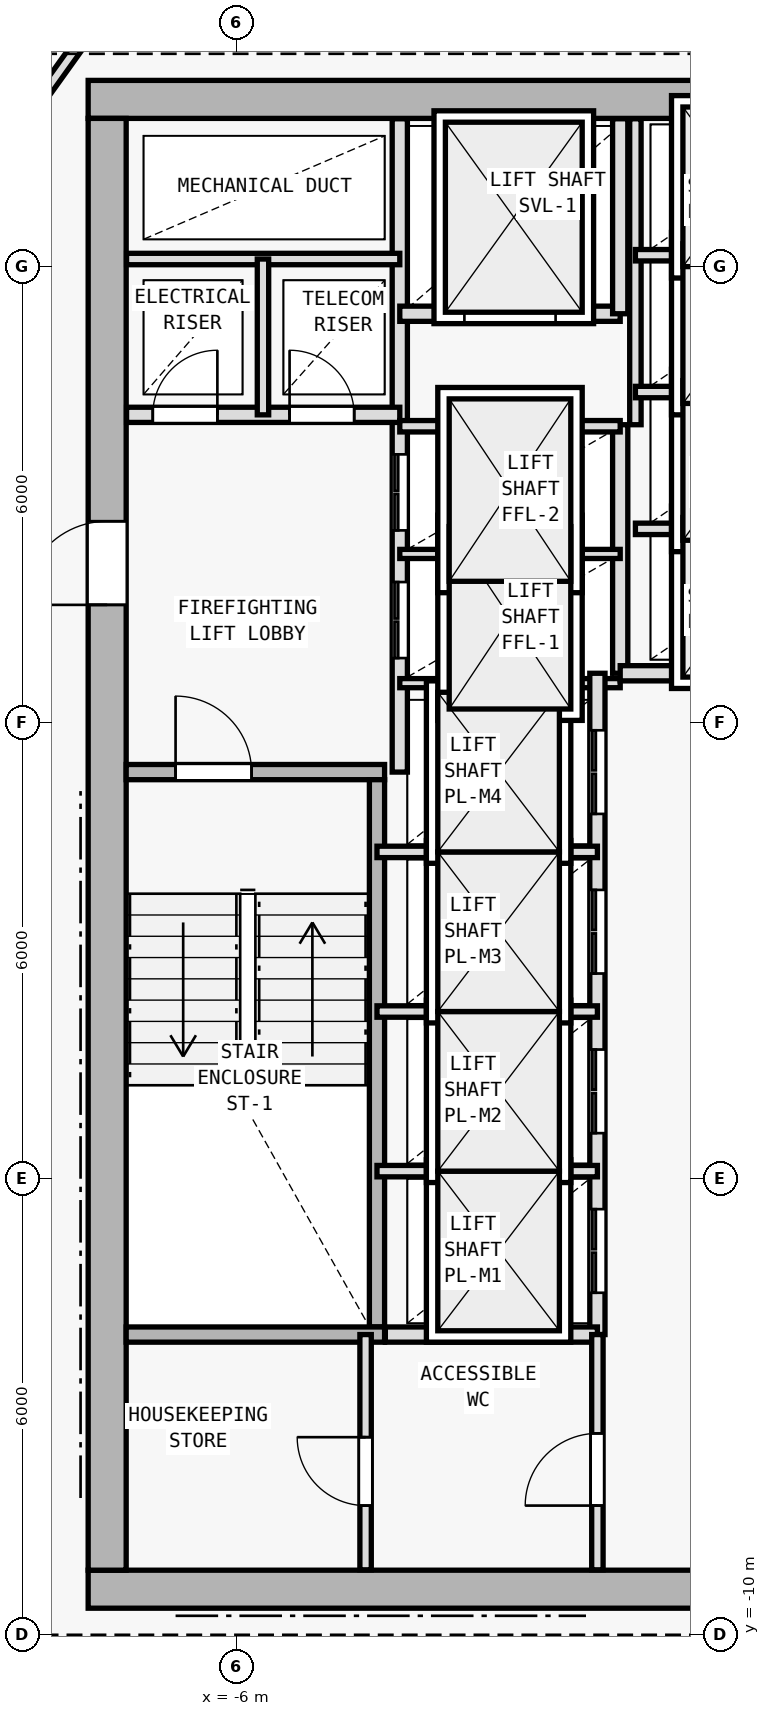
"""IFC4 building model, lengths in metres.
Left out: names, types, materials, properties, quantities, classifications, styles, units other than length and angle.
Written with IfcOpenShell. Run it as: python <this file> out.ifc"""

import sys

from ifc_helpers import new_model, si_unit, direction, frame, frame_2d, origin, origin_2d, place, context, subcontext, project, spatial, rectangle, i_section, extrude, element, fill, save


model = new_model("IFC4")
c1 = context("Model", 3, precision=1e-05, world=origin(), true_north=direction((0.0, 1.0)))
c2 = subcontext(c1, "Body", "Model", "MODEL_VIEW")
j1 = project(units=[si_unit("LENGTHUNIT", "METRE"), si_unit("PLANEANGLEUNIT", "RADIAN")], contexts=[c1])
p1 = place(None, origin())
s1 = spatial("IfcSite", under=j1, at=p1, CompositionType="ELEMENT")
p2 = place(p1, origin())
s2 = spatial("IfcBuilding", under=s1, at=p2, CompositionType="ELEMENT")
p3 = place(p2, frame((0.0, 0.0, 194.7)))
s3 = spatial("IfcBuildingStorey", under=s2, at=p3, CompositionType="ELEMENT", Elevation=194.7)
for number, where, z_axis, x_axis in (
    (1, (-7.7, -9.4, 0.0), (0.0, 0.0, 1.0), (1.0, 0.0, 0.0)),
    (2, (-7.7, 10.2, 0.0), (0.0, 0.0, 1.0), (1.0, 0.0, 0.0)),
    (3, (0.0, -9.4, 0.0), (0.0, 0.0, 1.0), (1.0, 0.0, 0.0)),
    (4, (-7.7, 2.0, 0.0), (0.0, 0.0, 1.0), (1.0, 0.0, 0.0)),
):
    element("IfcColumn", number, at=place(p3, frame(where, z_axis=z_axis, x_axis=x_axis)), inside=s3, PredefinedType="COLUMN", context=c2, shape_type="SweptSolid", body=[
        extrude(i_section(OverallWidth=0.398, OverallDepth=0.387, WebThickness=0.013, FlangeThickness=0.022, FilletRadius=0.015, at=origin_2d()), origin(), (0.0, 0.0, 1.0), 3.6),
    ])
p4 = place(p3, frame((-7.95, -9.4, 0.0), z_axis=(0.0, 0.0, 1.0), x_axis=(1.0, 0.0, 0.0)))
e5 = element("IfcWall", 5, at=p4, inside=s3, PredefinedType="SHEAR", context=c2, shape_type="SweptSolid", body=[
    extrude(rectangle(XDim=15.9, YDim=0.5, at=frame_2d((7.95, 0.0))), origin(), (0.0, 0.0, 1.0), 3.35),
])
p5 = place(p4, frame((9.6, 0.0, 0.0)))
e6 = element("IfcOpeningElement", 6, at=p5, cuts=e5, PredefinedType="OPENING", context=c2, shape_type="SweptSolid", body=[
    extrude(rectangle(XDim=1.5, YDim=2.2, at=frame_2d((0.75, 1.1))), frame((0.0, 0.26, 0.0), z_axis=(0.0, -1.0, 0.0), x_axis=(1.0, 0.0, 0.0)), (0.0, 0.0, 1.0), 0.52),
])
p6 = place(p3, frame((7.95, 10.2, 0.0), z_axis=(0.0, 0.0, 1.0), x_axis=(-1.0, 0.0, 0.0)))
e7 = element("IfcWall", 7, at=p6, inside=s3, PredefinedType="SHEAR", context=c2, shape_type="SweptSolid", body=[
    extrude(rectangle(XDim=15.9, YDim=0.5, at=frame_2d((7.95, 0.0))), origin(), (0.0, 0.0, 1.0), 3.35),
])
p7 = place(p6, frame((4.4, 0.0, 0.0)))
e8 = element("IfcOpeningElement", 8, at=p7, cuts=e7, PredefinedType="OPENING", context=c2, shape_type="SweptSolid", body=[
    extrude(rectangle(XDim=1.1, YDim=2.15, at=frame_2d((0.55, 1.075))), frame((0.0, 0.26, 0.0), z_axis=(0.0, -1.0, 0.0), x_axis=(1.0, 0.0, 0.0)), (0.0, 0.0, 1.0), 0.52),
])
p8 = place(p3, frame((-7.7, -9.15, 0.0), z_axis=(0.0, 0.0, 1.0), x_axis=(0.0, 1.0, 0.0)))
e9 = element("IfcWall", 9, at=p8, inside=s3, PredefinedType="SHEAR", context=c2, shape_type="SweptSolid", body=[
    extrude(rectangle(XDim=19.1, YDim=0.5, at=frame_2d((9.55, 0.0))), origin(), (0.0, 0.0, 1.0), 3.35),
])
p9 = place(p8, frame((12.7, 0.0, 0.0)))
e10 = element("IfcOpeningElement", 10, at=p9, cuts=e9, PredefinedType="OPENING", context=c2, shape_type="SweptSolid", body=[
    extrude(rectangle(XDim=1.1, YDim=2.15, at=frame_2d((0.55, 1.075))), frame((0.0, 0.26, 0.0), z_axis=(0.0, -1.0, 0.0), x_axis=(1.0, 0.0, 0.0)), (0.0, 0.0, 1.0), 0.52),
])
p10 = place(p3, frame((-7.45, 1.35, 0.0), z_axis=(0.0, 0.0, 1.0), x_axis=(1.0, 0.0, 0.0)))
e11 = element("IfcWall", 11, at=p10, inside=s3, PredefinedType="SOLIDWALL", context=c2, shape_type="SweptSolid", body=[
    extrude(rectangle(XDim=3.4, YDim=0.2, at=frame_2d((1.7, 0.0))), origin(), (0.0, 0.0, 1.0), 3.35),
])
p11 = place(p10, frame((0.65, 0.0, 0.0)))
e12 = element("IfcOpeningElement", 12, at=p11, cuts=e11, PredefinedType="OPENING", context=c2, shape_type="SweptSolid", body=[
    extrude(rectangle(XDim=1.0, YDim=2.15, at=frame_2d((0.5, 1.075))), frame((0.0, 0.11, 0.0), z_axis=(0.0, -1.0, 0.0), x_axis=(1.0, 0.0, 0.0)), (0.0, 0.0, 1.0), 0.22),
])
p12 = place(p3, frame((-4.15, -5.95, 0.0), z_axis=(0.0, 0.0, 1.0), x_axis=(0.0, 1.0, 0.0)))
e13 = element("IfcWall", 13, at=p12, inside=s3, PredefinedType="SOLIDWALL", context=c2, shape_type="SweptSolid", body=[
    extrude(rectangle(XDim=7.2, YDim=0.2, at=frame_2d((3.6, 0.0))), origin(), (0.0, 0.0, 1.0), 3.35),
])
p13 = place(p3, frame((-3.85, 1.35, 0.0), z_axis=(0.0, 0.0, 1.0), x_axis=(0.0, 1.0, 0.0)))
e14 = element("IfcWall", 14, at=p13, inside=s3, PredefinedType="SOLIDWALL", context=c2, shape_type="SweptSolid", body=[
    extrude(rectangle(XDim=8.595, YDim=0.2, at=frame_2d((4.297, 0.0))), origin(), (0.0, 0.0, 1.0), 3.35),
])
p14 = place(p13, frame((1.5, 0.0, 0.0)))
e15 = element("IfcOpeningElement", 15, at=p14, cuts=e14, PredefinedType="OPENING", context=c2, shape_type="SweptSolid", body=[
    extrude(rectangle(XDim=1.0, YDim=2.15, at=frame_2d((0.5, 1.075))), frame((0.0, 0.11, 0.0), z_axis=(0.0, -1.0, 0.0), x_axis=(1.0, 0.0, 0.0)), (0.0, 0.0, 1.0), 0.22),
])
p15 = place(p13, frame((3.18, 0.0, 0.0)))
e16 = element("IfcOpeningElement", 16, at=p15, cuts=e14, PredefinedType="OPENING", context=c2, shape_type="SweptSolid", body=[
    extrude(rectangle(XDim=1.0, YDim=2.15, at=frame_2d((0.5, 1.075))), frame((0.0, 0.11, 0.0), z_axis=(0.0, -1.0, 0.0), x_axis=(1.0, 0.0, 0.0)), (0.0, 0.0, 1.0), 0.22),
])
p16 = place(p3, frame((-7.445, 6.05, 0.0), z_axis=(0.0, 0.0, 1.0), x_axis=(1.0, 0.0, 0.0)))
e17 = element("IfcWall", 17, at=p16, inside=s3, PredefinedType="SOLIDWALL", context=c2, shape_type="SweptSolid", body=[
    extrude(rectangle(XDim=3.595, YDim=0.2, at=frame_2d((1.797, 0.0))), origin(), (0.0, 0.0, 1.0), 3.35),
])
p17 = place(p16, frame((0.345, 0.0, 0.0)))
e18 = element("IfcOpeningElement", 18, at=p17, cuts=e17, PredefinedType="OPENING", context=c2, shape_type="SweptSolid", body=[
    extrude(rectangle(XDim=0.85, YDim=2.1, at=frame_2d((0.425, 1.05))), frame((0.0, 0.11, 0.0), z_axis=(0.0, -1.0, 0.0), x_axis=(1.0, 0.0, 0.0)), (0.0, 0.0, 1.0), 0.22),
])
p18 = place(p16, frame((2.145, 0.0, 0.0)))
e19 = element("IfcOpeningElement", 19, at=p18, cuts=e17, PredefinedType="OPENING", context=c2, shape_type="SweptSolid", body=[
    extrude(rectangle(XDim=0.85, YDim=2.1, at=frame_2d((0.425, 1.05))), frame((0.0, 0.11, 0.0), z_axis=(0.0, -1.0, 0.0), x_axis=(1.0, 0.0, 0.0)), (0.0, 0.0, 1.0), 0.22),
])
p19 = place(p3, frame((-7.445, 8.1, 0.0), z_axis=(0.0, 0.0, 1.0), x_axis=(1.0, 0.0, 0.0)))
e20 = element("IfcWall", 20, at=p19, inside=s3, PredefinedType="PARTITIONING", context=c2, shape_type="SweptSolid", body=[
    extrude(rectangle(XDim=3.595, YDim=0.15, at=frame_2d((1.797, 0.0))), origin(), (0.0, 0.0, 1.0), 3.35),
])
p20 = place(p3, frame((-5.65, 6.05, 0.0), z_axis=(0.0, 0.0, 1.0), x_axis=(0.0, 1.0, 0.0)))
e21 = element("IfcWall", 21, at=p20, inside=s3, PredefinedType="PARTITIONING", context=c2, shape_type="SweptSolid", body=[
    extrude(rectangle(XDim=2.05, YDim=0.15, at=frame_2d((1.025, 0.0))), origin(), (0.0, 0.0, 1.0), 3.35),
])
p21 = place(p3, frame((-0.95, 2.65, 0.0), z_axis=(0.0, 0.0, 1.0), x_axis=(0.0, 1.0, 0.0)))
e22 = element("IfcWall", 22, at=p21, inside=s3, PredefinedType="SOLIDWALL", context=c2, shape_type="SweptSolid", body=[
    extrude(rectangle(XDim=3.27, YDim=0.2, at=frame_2d((1.635, 0.0))), origin(), (0.0, 0.0, 1.0), 3.35),
])
for number, where, z_axis, x_axis in (
    (23, (-3.85, 2.52, 0.0), (0.0, 0.0, 1.0), (1.0, 0.0, 0.0)),
    (24, (-3.85, 4.22, 0.0), (0.0, 0.0, 1.0), (1.0, 0.0, 0.0)),
):
    element("IfcWall", number, at=place(p3, frame(where, z_axis=z_axis, x_axis=x_axis)), inside=s3, PredefinedType="PARTITIONING", context=c2, shape_type="SweptSolid", body=[
        extrude(rectangle(XDim=2.9, YDim=0.12, at=frame_2d((1.45, 0.0))), origin(), (0.0, 0.0, 1.0), 3.35),
    ])
p22 = place(p3, frame((-3.85, 5.9, 0.0), z_axis=(0.0, 0.0, 1.0), x_axis=(1.0, 0.0, 0.0)))
e25 = element("IfcWall", 25, at=p22, inside=s3, PredefinedType="PARTITIONING", context=c2, shape_type="SweptSolid", body=[
    extrude(rectangle(XDim=2.9, YDim=0.15, at=frame_2d((1.45, 0.0))), origin(), (0.0, 0.0, 1.0), 3.35),
])
p23 = place(p3, frame((-3.85, 7.38, 0.0), z_axis=(0.0, 0.0, 1.0), x_axis=(1.0, 0.0, 0.0)))
e26 = element("IfcWall", 26, at=p23, inside=s3, PredefinedType="SOLIDWALL", context=c2, shape_type="SweptSolid", body=[
    extrude(rectangle(XDim=2.9, YDim=0.2, at=frame_2d((1.45, 0.0))), origin(), (0.0, 0.0, 1.0), 3.35),
])
p24 = place(p23, frame((0.85, 0.0, 0.0)))
e27 = element("IfcOpeningElement", 27, at=p24, cuts=e26, PredefinedType="OPENING", context=c2, shape_type="SweptSolid", body=[
    extrude(rectangle(XDim=1.2, YDim=2.2, at=frame_2d((0.6, 1.1))), frame((0.0, 0.11, 0.0), z_axis=(0.0, -1.0, 0.0), x_axis=(1.0, 0.0, 0.0)), (0.0, 0.0, 1.0), 0.22),
])
p25 = place(p3, frame((-0.95, 7.38, 0.0), z_axis=(0.0, 0.0, 1.0), x_axis=(0.0, 1.0, 0.0)))
e28 = element("IfcWall", 28, at=p25, inside=s3, PredefinedType="SOLIDWALL", context=c2, shape_type="SweptSolid", body=[
    extrude(rectangle(XDim=2.565, YDim=0.2, at=frame_2d((1.283, 0.0))), origin(), (0.0, 0.0, 1.0), 3.35),
])
p26 = place(p3, frame((-1.25, -6.05, 0.0), z_axis=(0.0, 0.0, 1.0), x_axis=(0.0, 1.0, 0.0)))
e29 = element("IfcWall", 29, at=p26, inside=s3, PredefinedType="SOLIDWALL", context=c2, shape_type="SweptSolid", body=[
    extrude(rectangle(XDim=8.7, YDim=0.2, at=frame_2d((4.35, 0.0))), origin(), (0.0, 0.0, 1.0), 3.35),
])
p27 = place(p26, frame((0.55, 0.0, 0.0)))
e30 = element("IfcOpeningElement", 30, at=p27, cuts=e29, PredefinedType="OPENING", context=c2, shape_type="SweptSolid", body=[
    extrude(rectangle(XDim=1.1, YDim=2.15, at=frame_2d((0.55, 1.075))), frame((0.0, 0.11, 0.0), z_axis=(0.0, -1.0, 0.0), x_axis=(1.0, 0.0, 0.0)), (0.0, 0.0, 1.0), 0.22),
])
p28 = place(p26, frame((2.65, 0.0, 0.0)))
e31 = element("IfcOpeningElement", 31, at=p28, cuts=e29, PredefinedType="OPENING", context=c2, shape_type="SweptSolid", body=[
    extrude(rectangle(XDim=1.1, YDim=2.15, at=frame_2d((0.55, 1.075))), frame((0.0, 0.11, 0.0), z_axis=(0.0, -1.0, 0.0), x_axis=(1.0, 0.0, 0.0)), (0.0, 0.0, 1.0), 0.22),
])
p29 = place(p26, frame((4.75, 0.0, 0.0)))
e32 = element("IfcOpeningElement", 32, at=p29, cuts=e29, PredefinedType="OPENING", context=c2, shape_type="SweptSolid", body=[
    extrude(rectangle(XDim=1.1, YDim=2.15, at=frame_2d((0.55, 1.075))), frame((0.0, 0.11, 0.0), z_axis=(0.0, -1.0, 0.0), x_axis=(1.0, 0.0, 0.0)), (0.0, 0.0, 1.0), 0.22),
])
p30 = place(p26, frame((6.85, 0.0, 0.0)))
e33 = element("IfcOpeningElement", 33, at=p30, cuts=e29, PredefinedType="OPENING", context=c2, shape_type="SweptSolid", body=[
    extrude(rectangle(XDim=1.1, YDim=2.15, at=frame_2d((0.55, 1.075))), frame((0.0, 0.11, 0.0), z_axis=(0.0, -1.0, 0.0), x_axis=(1.0, 0.0, 0.0)), (0.0, 0.0, 1.0), 0.22),
])
for number, where, z_axis, x_axis in (
    (34, (-4.15, -3.9, 0.0), (0.0, 0.0, 1.0), (1.0, 0.0, 0.0)),
    (35, (-4.15, -1.8, 0.0), (0.0, 0.0, 1.0), (1.0, 0.0, 0.0)),
    (36, (-4.15, 0.3, 0.0), (0.0, 0.0, 1.0), (1.0, 0.0, 0.0)),
):
    element("IfcWall", number, at=place(p3, frame(where, z_axis=z_axis, x_axis=x_axis)), inside=s3, PredefinedType="PARTITIONING", context=c2, shape_type="SweptSolid", body=[
        extrude(rectangle(XDim=2.9, YDim=0.15, at=frame_2d((1.45, 0.0))), origin(), (0.0, 0.0, 1.0), 3.35),
    ])
p31 = place(p3, frame((-0.95, 2.65, 0.0), z_axis=(0.0, 0.0, 1.0), x_axis=(1.0, 0.0, 0.0)))
e37 = element("IfcWall", 37, at=p31, inside=s3, PredefinedType="SOLIDWALL", context=c2, shape_type="SweptSolid", body=[
    extrude(rectangle(XDim=2.9, YDim=0.2, at=frame_2d((1.45, 0.0))), origin(), (0.0, 0.0, 1.0), 3.35),
])
p32 = place(p3, frame((-0.75, 5.92, 0.0), z_axis=(0.0, 0.0, 1.0), x_axis=(0.0, 1.0, 0.0)))
e38 = element("IfcWall", 38, at=p32, inside=s3, PredefinedType="PARTITIONING", context=c2, shape_type="SweptSolid", body=[
    extrude(rectangle(XDim=4.025, YDim=0.15, at=frame_2d((2.013, 0.0))), origin(), (0.0, 0.0, 1.0), 3.35),
])
for number, where, z_axis, x_axis in (
    (39, (-0.75, 4.55, 0.0), (0.0, 0.0, 1.0), (1.0, 0.0, 0.0)),
    (40, (-0.75, 6.35, 0.0), (0.0, 0.0, 1.0), (1.0, 0.0, 0.0)),
    (41, (-0.75, 8.15, 0.0), (0.0, 0.0, 1.0), (1.0, 0.0, 0.0)),
):
    element("IfcWall", number, at=place(p3, frame(where, z_axis=z_axis, x_axis=x_axis)), inside=s3, PredefinedType="PARTITIONING", context=c2, shape_type="SweptSolid", body=[
        extrude(rectangle(XDim=2.7, YDim=0.15, at=frame_2d((1.35, 0.0))), origin(), (0.0, 0.0, 1.0), 3.35),
    ])
p33 = place(p3, frame((-7.45, -6.05, 0.0), z_axis=(0.0, 0.0, 1.0), x_axis=(1.0, 0.0, 0.0)))
e42 = element("IfcWall", 42, at=p33, inside=s3, PredefinedType="SOLIDWALL", context=c2, shape_type="SweptSolid", body=[
    extrude(rectangle(XDim=3.4, YDim=0.2, at=frame_2d((1.7, 0.0))), origin(), (0.0, 0.0, 1.0), 3.35),
])
p34 = place(p3, frame((-4.04, -6.05, 0.0), z_axis=(0.0, 0.0, 1.0), x_axis=(1.0, 0.0, 0.0)))
e43 = element("IfcWall", 43, at=p34, inside=s3, PredefinedType="SOLIDWALL", context=c2, shape_type="SweptSolid", body=[
    extrude(rectangle(XDim=2.79, YDim=0.2, at=frame_2d((1.395, 0.0))), origin(), (0.0, 0.0, 1.0), 3.35),
])
p35 = place(p3, frame((-1.25, -9.145, 0.0), z_axis=(0.0, 0.0, 1.0), x_axis=(0.0, 1.0, 0.0)))
e44 = element("IfcWall", 44, at=p35, inside=s3, PredefinedType="PARTITIONING", context=c2, shape_type="SweptSolid", body=[
    extrude(rectangle(XDim=3.095, YDim=0.15, at=frame_2d((1.547, 0.0))), origin(), (0.0, 0.0, 1.0), 3.35),
])
p36 = place(p35, frame((0.845, 0.0, 0.0)))
e45 = element("IfcOpeningElement", 45, at=p36, cuts=e44, PredefinedType="OPENING", context=c2, shape_type="SweptSolid", body=[
    extrude(rectangle(XDim=0.95, YDim=2.1, at=frame_2d((0.475, 1.05))), frame((0.0, 0.085, 0.0), z_axis=(0.0, -1.0, 0.0), x_axis=(1.0, 0.0, 0.0)), (0.0, 0.0, 1.0), 0.17),
])
p37 = place(p3, frame((-4.3, -9.145, 0.0), z_axis=(0.0, 0.0, 1.0), x_axis=(0.0, 1.0, 0.0)))
e46 = element("IfcWall", 46, at=p37, inside=s3, PredefinedType="PARTITIONING", context=c2, shape_type="SweptSolid", body=[
    extrude(rectangle(XDim=3.095, YDim=0.15, at=frame_2d((1.547, 0.0))), origin(), (0.0, 0.0, 1.0), 3.35),
])
p38 = place(p37, frame((0.845, 0.0, 0.0)))
e47 = element("IfcOpeningElement", 47, at=p38, cuts=e46, PredefinedType="OPENING", context=c2, shape_type="SweptSolid", body=[
    extrude(rectangle(XDim=0.9, YDim=2.1, at=frame_2d((0.45, 1.05))), frame((0.0, 0.085, 0.0), z_axis=(0.0, -1.0, 0.0), x_axis=(1.0, 0.0, 0.0)), (0.0, 0.0, 1.0), 0.17),
])
p39 = place(p3, frame((-9.86, 8.426, 0.0), z_axis=(0.0, 0.0, 1.0), x_axis=(0.582449511476, 0.812866881218, 0.0)))
e48 = element("IfcWall", 48, at=p39, inside=s3, PredefinedType="PARTITIONING", context=c2, shape_type="SweptSolid", body=[
    extrude(rectangle(XDim=4.84, YDim=0.15, at=frame_2d((2.42, 0.0))), origin(), (0.0, 0.0, 1.0), 2.935),
])
p40 = place(p9, origin())
e49 = element("IfcDoor", 49, at=p40, inside=s3, OperationType="SINGLE_SWING_LEFT", PredefinedType="DOOR", context=c2, shape_type="SweptSolid", body=[
    extrude(rectangle(XDim=1.1, YDim=2.15, at=frame_2d((0.55, 1.075))), frame((0.0, 0.025, 0.0), z_axis=(0.0, -1.0, 0.0), x_axis=(1.0, 0.0, 0.0)), (0.0, 0.0, 1.0), 0.05),
])
fill(e10, e49)
p41 = place(p11, origin())
e50 = element("IfcDoor", 50, at=p41, inside=s3, OperationType="SINGLE_SWING_LEFT", PredefinedType="DOOR", context=c2, shape_type="SweptSolid", body=[
    extrude(rectangle(XDim=1.0, YDim=2.15, at=frame_2d((0.5, 1.075))), frame((0.0, 0.025, 0.0), z_axis=(0.0, -1.0, 0.0), x_axis=(1.0, 0.0, 0.0)), (0.0, 0.0, 1.0), 0.05),
])
fill(e12, e50)
p42 = place(p17, origin())
e51 = element("IfcDoor", 51, at=p42, inside=s3, OperationType="SINGLE_SWING_RIGHT", PredefinedType="DOOR", context=c2, shape_type="SweptSolid", body=[
    extrude(rectangle(XDim=0.85, YDim=2.1, at=frame_2d((0.425, 1.05))), frame((0.0, 0.025, 0.0), z_axis=(0.0, -1.0, 0.0), x_axis=(1.0, 0.0, 0.0)), (0.0, 0.0, 1.0), 0.05),
])
fill(e18, e51)
p43 = place(p18, origin())
e52 = element("IfcDoor", 52, at=p43, inside=s3, OperationType="SINGLE_SWING_LEFT", PredefinedType="DOOR", context=c2, shape_type="SweptSolid", body=[
    extrude(rectangle(XDim=0.85, YDim=2.1, at=frame_2d((0.425, 1.05))), frame((0.0, 0.025, 0.0), z_axis=(0.0, -1.0, 0.0), x_axis=(1.0, 0.0, 0.0)), (0.0, 0.0, 1.0), 0.05),
])
fill(e19, e52)
p44 = place(p24, origin())
e53 = element("IfcDoor", 53, at=p44, inside=s3, OperationType="DOUBLE_DOOR_SLIDING", PredefinedType="DOOR", context=c2, shape_type="SweptSolid", body=[
    extrude(rectangle(XDim=1.2, YDim=2.2, at=frame_2d((0.6, 1.1))), frame((0.0, 0.025, 0.0), z_axis=(0.0, -1.0, 0.0), x_axis=(1.0, 0.0, 0.0)), (0.0, 0.0, 1.0), 0.05),
])
fill(e27, e53)
p45 = place(p27, origin())
e54 = element("IfcDoor", 54, at=p45, inside=s3, OperationType="DOUBLE_DOOR_SLIDING", PredefinedType="DOOR", context=c2, shape_type="SweptSolid", body=[
    extrude(rectangle(XDim=1.1, YDim=2.15, at=frame_2d((0.55, 1.075))), frame((0.0, 0.025, 0.0), z_axis=(0.0, -1.0, 0.0), x_axis=(1.0, 0.0, 0.0)), (0.0, 0.0, 1.0), 0.05),
])
fill(e30, e54)
p46 = place(p28, origin())
e55 = element("IfcDoor", 55, at=p46, inside=s3, OperationType="DOUBLE_DOOR_SLIDING", PredefinedType="DOOR", context=c2, shape_type="SweptSolid", body=[
    extrude(rectangle(XDim=1.1, YDim=2.15, at=frame_2d((0.55, 1.075))), frame((0.0, 0.025, 0.0), z_axis=(0.0, -1.0, 0.0), x_axis=(1.0, 0.0, 0.0)), (0.0, 0.0, 1.0), 0.05),
])
fill(e31, e55)
p47 = place(p29, origin())
e56 = element("IfcDoor", 56, at=p47, inside=s3, OperationType="DOUBLE_DOOR_SLIDING", PredefinedType="DOOR", context=c2, shape_type="SweptSolid", body=[
    extrude(rectangle(XDim=1.1, YDim=2.15, at=frame_2d((0.55, 1.075))), frame((0.0, 0.025, 0.0), z_axis=(0.0, -1.0, 0.0), x_axis=(1.0, 0.0, 0.0)), (0.0, 0.0, 1.0), 0.05),
])
fill(e32, e56)
p48 = place(p30, origin())
e57 = element("IfcDoor", 57, at=p48, inside=s3, OperationType="DOUBLE_DOOR_SLIDING", PredefinedType="DOOR", context=c2, shape_type="SweptSolid", body=[
    extrude(rectangle(XDim=1.1, YDim=2.15, at=frame_2d((0.55, 1.075))), frame((0.0, 0.025, 0.0), z_axis=(0.0, -1.0, 0.0), x_axis=(1.0, 0.0, 0.0)), (0.0, 0.0, 1.0), 0.05),
])
fill(e33, e57)
p49 = place(p14, origin())
e58 = element("IfcDoor", 58, at=p49, inside=s3, OperationType="DOUBLE_DOOR_SLIDING", PredefinedType="DOOR", context=c2, shape_type="SweptSolid", body=[
    extrude(rectangle(XDim=1.0, YDim=2.15, at=frame_2d((0.5, 1.075))), frame((0.0, 0.025, 0.0), z_axis=(0.0, -1.0, 0.0), x_axis=(1.0, 0.0, 0.0)), (0.0, 0.0, 1.0), 0.05),
])
fill(e15, e58)
p50 = place(p15, origin())
e59 = element("IfcDoor", 59, at=p50, inside=s3, OperationType="DOUBLE_DOOR_SLIDING", PredefinedType="DOOR", context=c2, shape_type="SweptSolid", body=[
    extrude(rectangle(XDim=1.0, YDim=2.15, at=frame_2d((0.5, 1.075))), frame((0.0, 0.025, 0.0), z_axis=(0.0, -1.0, 0.0), x_axis=(1.0, 0.0, 0.0)), (0.0, 0.0, 1.0), 0.05),
])
fill(e16, e59)
p51 = place(p36, origin())
e60 = element("IfcDoor", 60, at=p51, inside=s3, OperationType="SINGLE_SWING_LEFT", PredefinedType="DOOR", context=c2, shape_type="SweptSolid", body=[
    extrude(rectangle(XDim=0.95, YDim=2.1, at=frame_2d((0.475, 1.05))), frame((0.0, 0.025, 0.0), z_axis=(0.0, -1.0, 0.0), x_axis=(1.0, 0.0, 0.0)), (0.0, 0.0, 1.0), 0.05),
])
fill(e45, e60)
p52 = place(p38, origin())
e61 = element("IfcDoor", 61, at=p52, inside=s3, OperationType="SINGLE_SWING_RIGHT", PredefinedType="DOOR", context=c2, shape_type="SweptSolid", body=[
    extrude(rectangle(XDim=0.9, YDim=2.1, at=frame_2d((0.45, 1.05))), frame((0.0, 0.025, 0.0), z_axis=(0.0, -1.0, 0.0), x_axis=(1.0, 0.0, 0.0)), (0.0, 0.0, 1.0), 0.05),
])
fill(e47, e61)
save(model, sys.argv[1])
